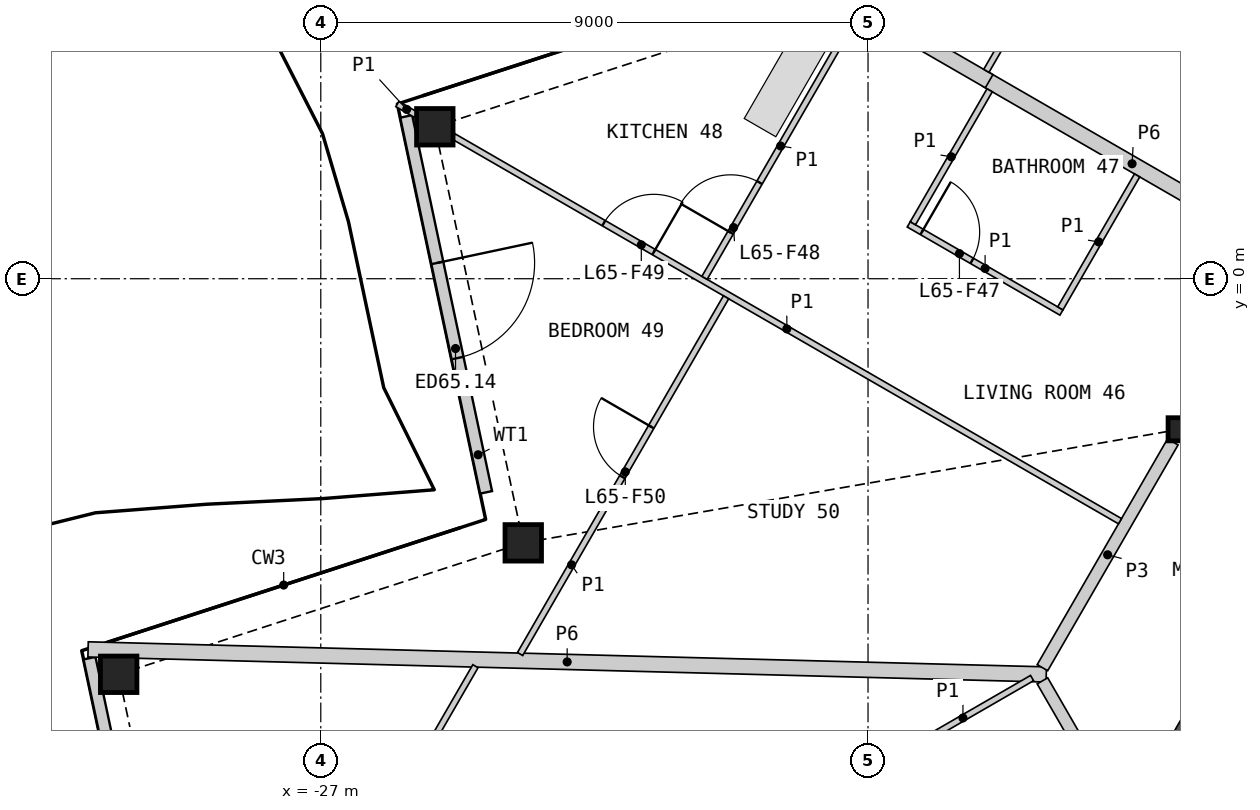
"""IFC4 building model, lengths in metres.
Left out: names, types, materials, properties, quantities, classifications, styles, units other than length and angle.
Written with IfcOpenShell. Run it as: python <this file> out.ifc"""

import sys

from ifc_helpers import new_model, si_unit, direction, frame, frame_2d, origin, origin_2d, place, context, subcontext, project, spatial, polyline, rectangle, hollow_rectangle, i_section, outline, extrude, element, fill, save


model = new_model("IFC4")
c1 = context("Model", 3, precision=1e-05, world=origin(), true_north=direction((0.0, 1.0)))
c2 = subcontext(c1, "Body", "Model", "MODEL_VIEW")
j1 = project(units=[si_unit("LENGTHUNIT", "METRE"), si_unit("PLANEANGLEUNIT", "RADIAN")], contexts=[c1])
p1 = place(None, origin())
s1 = spatial("IfcSite", under=j1, at=p1, CompositionType="ELEMENT")
p2 = place(p1, origin())
s2 = spatial("IfcBuilding", under=s1, at=p2, CompositionType="ELEMENT")
p3 = place(p2, frame((0.0, 0.0, 301.8)))
s3 = spatial("IfcBuildingStorey", under=s2, at=p3, CompositionType="ELEMENT", Elevation=301.8)
for number, where, z_axis, x_axis in (
    (1, (-25.125, 2.499, 0.0), (0.0, 0.0, 1.0), (1.0, 0.0, 0.0)),
    (2, (-23.67, -4.344, 0.0), (0.0, 0.0, 1.0), (1.0, 0.0, 0.0)),
    (3, (-30.324, -6.506, 0.0), (0.0, 0.0, 1.0), (1.0, 0.0, 0.0)),
):
    element("IfcColumn", number, at=place(p3, frame(where, z_axis=z_axis, x_axis=x_axis)), inside=s3, PredefinedType="COLUMN", context=c2, shape_type="SweptSolid", body=[
        extrude(hollow_rectangle(XDim=0.6, YDim=0.6, WallThickness=0.04, at=origin_2d()), origin(), (0.0, 0.0, 1.0), 3.4),
    ])
p4 = place(p3, frame((-12.868, -2.476, 0.0), z_axis=(0.0, 0.0, 1.0), x_axis=(1.0, 0.0, 0.0)))
e4 = element("IfcColumn", 4, at=p4, inside=s3, PredefinedType="COLUMN", context=c2, shape_type="SweptSolid", body=[
    extrude(i_section(OverallWidth=0.396, OverallDepth=0.381, WebThickness=0.019, FlangeThickness=0.03, at=origin_2d()), origin(), (0.0, 0.0, 1.0), 3.4),
])
p5 = place(p3, frame((-25.595, 2.67, 0.0), z_axis=(0.0, 0.0, 1.0), x_axis=(0.207888316408, -0.978152568826, 0.0)))
e5 = element("IfcWall", 5, at=p5, inside=s3, PredefinedType="SOLIDWALL", context=c2, shape_type="SweptSolid", body=[
    extrude(rectangle(XDim=6.322, YDim=0.2, at=frame_2d((3.161, 0.0))), origin(), (0.0, 0.0, 1.0), 2.488),
])
p6 = place(p5, frame((2.463, 0.0, 0.0)))
e6 = element("IfcOpeningElement", 6, at=p6, cuts=e5, PredefinedType="OPENING", context=c2, shape_type="SweptSolid", body=[
    extrude(rectangle(XDim=1.6, YDim=2.25, at=frame_2d((0.8, 1.125))), frame((0.0, 0.11, 0.0), z_axis=(0.0, -1.0, 0.0), x_axis=(1.0, 0.0, 0.0)), (0.0, 0.0, 1.0), 0.22),
])
p7 = place(p3, frame((-30.803, -6.241, 0.0), z_axis=(0.0, 0.0, 1.0), x_axis=(0.207917941651, -0.978146272057, 0.0)))
e7 = element("IfcWall", 7, at=p7, inside=s3, PredefinedType="SOLIDWALL", context=c2, shape_type="SweptSolid", body=[
    extrude(rectangle(XDim=6.759, YDim=0.2, at=frame_2d((3.379, 0.0))), origin(), (0.0, 0.0, 1.0), 2.488),
])
p8 = place(p7, frame((2.545, 0.0, 0.0)))
e8 = element("IfcOpeningElement", 8, at=p8, cuts=e7, PredefinedType="OPENING", context=c2, shape_type="SweptSolid", body=[
    extrude(rectangle(XDim=1.6, YDim=2.25, at=frame_2d((0.8, 1.125))), frame((0.0, 0.11, 0.0), z_axis=(0.0, -1.0, 0.0), x_axis=(1.0, 0.0, 0.0)), (0.0, 0.0, 1.0), 0.22),
])
p9 = place(p3, origin())
e9 = element("IfcWall", 9, at=p9, inside=s3, PredefinedType="SHEAR", context=c2, shape_type="SweptSolid", body=[
    extrude(outline(polyline([(-12.48, -6.606), (-11.961, -6.906), (-11.961, -7.506), (-13.0, -7.506), (-12.48, -6.606)])), origin(), (0.0, 0.0, 1.0), 3.1),
])
p10 = place(p3, frame((-30.827, -6.096, 0.0), z_axis=(0.0, 0.0, 1.0), x_axis=(0.999657799118, -0.026158835273, 0.0)))
e10 = element("IfcWall", 10, at=p10, inside=s3, PredefinedType="PARTITIONING", context=c2, shape_type="SweptSolid", body=[
    extrude(rectangle(XDim=15.763, YDim=0.25, at=frame_2d((7.882, 0.0))), origin(), (0.0, 0.0, 1.0), 2.33),
])
p11 = place(p3, frame((-16.054, 3.275, 0.0), z_axis=(0.0, 0.0, 1.0), x_axis=(0.866019581949, -0.500010083578, 0.0)))
e11 = element("IfcWall", 11, at=p11, inside=s3, PredefinedType="PARTITIONING", context=c2, shape_type="SweptSolid", body=[
    extrude(rectangle(XDim=5.535, YDim=0.25, at=frame_2d((2.768, 0.0))), origin(), (0.0, 0.0, 1.0), 2.33),
])
p12 = place(p3, frame((-15.131, -6.397, 0.0), z_axis=(0.0, 0.0, 1.0), x_axis=(0.500003406062, 0.866023437285, 0.0)))
e12 = element("IfcWall", 12, at=p12, inside=s3, PredefinedType="PARTITIONING", context=c2, shape_type="SweptSolid", body=[
    extrude(rectangle(XDim=4.288, YDim=0.2, at=frame_2d((2.144, 0.0))), origin(), (0.0, 0.0, 1.0), 3.1),
])
p13 = place(p3, frame((-15.131, -6.614, 0.0), z_axis=(0.0, 0.0, 1.0), x_axis=(0.499967746641, -0.866044024469, 0.0)))
e13 = element("IfcWall", 13, at=p13, inside=s3, PredefinedType="PARTITIONING", context=c2, shape_type="SweptSolid", body=[
    extrude(rectangle(XDim=3.676, YDim=0.2, at=frame_2d((1.838, 0.0))), origin(), (0.0, 0.0, 1.0), 3.1),
])
p14 = place(p13, frame((2.426, 0.0, 0.0)))
e14 = element("IfcOpeningElement", 14, at=p14, cuts=e13, PredefinedType="OPENING", context=c2, shape_type="SweptSolid", body=[
    extrude(rectangle(XDim=1.0, YDim=2.1, at=frame_2d((0.5, 1.05))), frame((0.0, 0.11, 0.0), z_axis=(0.0, -1.0, 0.0), x_axis=(1.0, 0.0, 0.0)), (0.0, 0.0, 1.0), 0.22),
])
p15 = place(p3, frame((-18.127, 4.472, 0.0), z_axis=(0.0, 0.0, 1.0), x_axis=(0.866017755388, -0.500013247177, 0.0)))
e15 = element("IfcWall", 15, at=p15, inside=s3, PredefinedType="PARTITIONING", context=c2, shape_type="SweptSolid", body=[
    extrude(rectangle(XDim=2.447, YDim=0.25, at=frame_2d((1.223, 0.0))), origin(), (0.0, 0.0, 1.0), 2.33),
])
p16 = place(p3, frame((-16.054, 3.419, 0.0), z_axis=(0.0, 0.0, 1.0), x_axis=(0.499999256795, 0.866025832873, 0.0)))
e16 = element("IfcWall", 16, at=p16, inside=s3, PredefinedType="PARTITIONING", context=c2, shape_type="SweptSolid", body=[
    extrude(rectangle(XDim=15.448, YDim=0.1, at=frame_2d((7.724, 0.0))), origin(), (0.0, 0.0, 1.0), 2.33),
])
p17 = place(p16, frame((8.306, 0.0, 0.0)))
e17 = element("IfcOpeningElement", 17, at=p17, cuts=e16, PredefinedType="OPENING", context=c2, shape_type="SweptSolid", body=[
    extrude(rectangle(XDim=0.95, YDim=2.1, at=frame_2d((0.475, 1.05))), frame((0.0, 0.06, 0.0), z_axis=(0.0, -1.0, 0.0), x_axis=(1.0, 0.0, 0.0)), (0.0, 0.0, 1.0), 0.12),
])
p18 = place(p16, frame((1.76, 0.0, 0.0)))
e18 = element("IfcOpeningElement", 18, at=p18, cuts=e16, PredefinedType="OPENING", context=c2, shape_type="SweptSolid", body=[
    extrude(rectangle(XDim=0.95, YDim=2.1, at=frame_2d((0.475, 1.05))), frame((0.0, 0.06, 0.0), z_axis=(0.0, -1.0, 0.0), x_axis=(1.0, 0.0, 0.0)), (0.0, 0.0, 1.0), 0.12),
])
p19 = place(p3, frame((-24.815, 2.339, 0.0), z_axis=(0.0, 0.0, 1.0), x_axis=(0.866021406514, -0.500006923412, 0.0)))
e19 = element("IfcWall", 19, at=p19, inside=s3, PredefinedType="PARTITIONING", context=c2, shape_type="SweptSolid", body=[
    extrude(rectangle(XDim=12.654, YDim=0.1, at=frame_2d((6.327, 0.0))), origin(), (0.0, 0.0, 1.0), 2.33),
])
p20 = place(p19, frame((2.851, 0.0, 0.0)))
e20 = element("IfcOpeningElement", 20, at=p20, cuts=e19, PredefinedType="OPENING", context=c2, shape_type="SweptSolid", body=[
    extrude(rectangle(XDim=0.95, YDim=2.1, at=frame_2d((0.475, 1.05))), frame((0.0, 0.06, 0.0), z_axis=(0.0, -1.0, 0.0), x_axis=(1.0, 0.0, 0.0)), (0.0, 0.0, 1.0), 0.12),
])
p21 = place(p3, frame((-23.722, -6.172, 0.0), z_axis=(0.0, 0.0, 1.0), x_axis=(0.499991774685, 0.86603015262, 0.0)))
e21 = element("IfcWall", 21, at=p21, inside=s3, PredefinedType="PARTITIONING", context=c2, shape_type="SweptSolid", body=[
    extrude(rectangle(XDim=6.774, YDim=0.1, at=frame_2d((3.387, 0.0))), origin(), (0.0, 0.0, 1.0), 2.33),
])
p22 = place(p21, frame((3.364, 0.0, 0.0)))
e22 = element("IfcOpeningElement", 22, at=p22, cuts=e21, PredefinedType="OPENING", context=c2, shape_type="SweptSolid", body=[
    extrude(rectangle(XDim=0.95, YDim=2.1, at=frame_2d((0.475, 1.05))), frame((0.0, 0.06, 0.0), z_axis=(0.0, -1.0, 0.0), x_axis=(1.0, 0.0, 0.0)), (0.0, 0.0, 1.0), 0.12),
])
p23 = place(p3, frame((-20.689, 0.014, 0.0), z_axis=(0.0, 0.0, 1.0), x_axis=(0.500003822013, 0.866023197133, 0.0)))
e23 = element("IfcWall", 23, at=p23, inside=s3, PredefinedType="PARTITIONING", context=c2, shape_type="SweptSolid", body=[
    extrude(rectangle(XDim=5.007, YDim=0.1, at=frame_2d((2.504, 0.0))), origin(), (0.0, 0.0, 1.0), 2.33),
])
p24 = place(p23, frame((0.86, 0.0, 0.0)))
e24 = element("IfcOpeningElement", 24, at=p24, cuts=e23, PredefinedType="OPENING", context=c2, shape_type="SweptSolid", body=[
    extrude(rectangle(XDim=0.95, YDim=2.1, at=frame_2d((0.475, 1.05))), frame((0.0, 0.06, 0.0), z_axis=(0.0, -1.0, 0.0), x_axis=(1.0, 0.0, 0.0)), (0.0, 0.0, 1.0), 0.12),
])
p25 = place(p3, frame((-26.788, -10.41, 0.0), z_axis=(0.0, 0.0, 1.0), x_axis=(0.499997484116, 0.866026856326, 0.0)))
e25 = element("IfcWall", 25, at=p25, inside=s3, PredefinedType="PARTITIONING", context=c2, shape_type="SweptSolid", body=[
    extrude(rectangle(XDim=4.662, YDim=0.1, at=frame_2d((2.331, 0.0))), origin(), (0.0, 0.0, 1.0), 2.33),
])
p26 = place(p25, frame((0.752, 0.0, 0.0)))
e26 = element("IfcOpeningElement", 26, at=p26, cuts=e25, PredefinedType="OPENING", context=c2, shape_type="SweptSolid", body=[
    extrude(rectangle(XDim=0.95, YDim=2.1, at=frame_2d((0.475, 1.05))), frame((0.0, 0.06, 0.0), z_axis=(0.0, -1.0, 0.0), x_axis=(1.0, 0.0, 0.0)), (0.0, 0.0, 1.0), 0.12),
])
p27 = place(p3, frame((-17.33, 0.894, 0.0), z_axis=(0.0, 0.0, 1.0), x_axis=(0.866032775405, -0.499987231761, 0.0)))
e27 = element("IfcWall", 27, at=p27, inside=s3, PredefinedType="PARTITIONING", context=c2, shape_type="SweptSolid", body=[
    extrude(rectangle(XDim=2.9, YDim=0.1, at=frame_2d((1.45, 0.0))), origin(), (0.0, 0.0, 1.0), 2.33),
])
p28 = place(p27, frame((0.25, 0.0, 0.0)))
e28 = element("IfcOpeningElement", 28, at=p28, cuts=e27, PredefinedType="OPENING", context=c2, shape_type="SweptSolid", body=[
    extrude(rectangle(XDim=0.95, YDim=2.1, at=frame_2d((0.475, 1.05))), frame((0.0, 0.06, 0.0), z_axis=(0.0, -1.0, 0.0), x_axis=(1.0, 0.0, 0.0)), (0.0, 0.0, 1.0), 0.12),
])
p29 = place(p3, frame((-14.837, -0.488, 0.0), z_axis=(0.0, 0.0, 1.0), x_axis=(0.499976333282, 0.866039067339, 0.0)))
e29 = element("IfcWall", 29, at=p29, inside=s3, PredefinedType="PARTITIONING", context=c2, shape_type="SweptSolid", body=[
    extrude(rectangle(XDim=2.525, YDim=0.1, at=frame_2d((1.262, 0.0))), origin(), (0.0, 0.0, 1.0), 2.33),
])
p30 = place(p3, frame((-17.262, 0.912, 0.0), z_axis=(0.0, 0.0, 1.0), x_axis=(0.500048846702, 0.865997200291, 0.0)))
e30 = element("IfcWall", 30, at=p30, inside=s3, PredefinedType="PARTITIONING", context=c2, shape_type="SweptSolid", body=[
    extrude(rectangle(XDim=2.525, YDim=0.1, at=frame_2d((1.263, 0.0))), origin(), (0.0, 0.0, 1.0), 2.33),
])
p31 = place(p3, frame((-17.575, -7.881, 0.0), z_axis=(0.0, 0.0, 1.0), x_axis=(0.866013657776, 0.500020344131, 0.0)))
e31 = element("IfcWall", 31, at=p31, inside=s3, PredefinedType="PARTITIONING", context=c2, shape_type="SweptSolid", body=[
    extrude(rectangle(XDim=2.625, YDim=0.1, at=frame_2d((1.312, 0.0))), origin(), (0.0, 0.0, 1.0), 2.33),
])
p32 = place(p3, frame((-25.741, 2.874, 0.0), z_axis=(0.0, 0.0, 1.0), x_axis=(0.865851769275, -0.500300623268, 0.0)))
e32 = element("IfcWall", 32, at=p32, inside=s3, PredefinedType="PARTITIONING", context=c2, shape_type="SweptSolid", body=[
    extrude(rectangle(XDim=0.353, YDim=0.1, at=frame_2d((0.177, 0.0))), origin(), (0.0, 0.0, 1.0), 2.33),
])
p33 = place(p6, origin())
e33 = element("IfcDoor", 33, at=p33, inside=s3, OperationType="DOUBLE_DOOR_SINGLE_SWING", PredefinedType="DOOR", context=c2, shape_type="SweptSolid", body=[
    extrude(rectangle(XDim=1.6, YDim=2.25, at=frame_2d((0.8, 1.125))), frame((0.0, 0.025, 0.0), z_axis=(0.0, -1.0, 0.0), x_axis=(1.0, 0.0, 0.0)), (0.0, 0.0, 1.0), 0.05),
])
fill(e6, e33)
p34 = place(p28, origin())
e34 = element("IfcDoor", 34, at=p34, inside=s3, OperationType="SINGLE_SWING_LEFT", PredefinedType="DOOR", context=c2, shape_type="SweptSolid", body=[
    extrude(rectangle(XDim=0.95, YDim=2.1, at=frame_2d((0.475, 1.05))), frame((0.0, 0.025, 0.0), z_axis=(0.0, -1.0, 0.0), x_axis=(1.0, 0.0, 0.0)), (0.0, 0.0, 1.0), 0.05),
])
fill(e28, e34)
p35 = place(p24, origin())
e35 = element("IfcDoor", 35, at=p35, inside=s3, OperationType="SINGLE_SWING_LEFT", PredefinedType="DOOR", context=c2, shape_type="SweptSolid", body=[
    extrude(rectangle(XDim=0.95, YDim=2.1, at=frame_2d((0.475, 1.05))), frame((0.0, 0.025, 0.0), z_axis=(0.0, -1.0, 0.0), x_axis=(1.0, 0.0, 0.0)), (0.0, 0.0, 1.0), 0.05),
])
fill(e24, e35)
p36 = place(p20, origin())
e36 = element("IfcDoor", 36, at=p36, inside=s3, OperationType="SINGLE_SWING_RIGHT", PredefinedType="DOOR", context=c2, shape_type="SweptSolid", body=[
    extrude(rectangle(XDim=0.95, YDim=2.1, at=frame_2d((0.475, 1.05))), frame((0.0, 0.025, 0.0), z_axis=(0.0, -1.0, 0.0), x_axis=(1.0, 0.0, 0.0)), (0.0, 0.0, 1.0), 0.05),
])
fill(e20, e36)
p37 = place(p22, origin())
e37 = element("IfcDoor", 37, at=p37, inside=s3, OperationType="SINGLE_SWING_RIGHT", PredefinedType="DOOR", context=c2, shape_type="SweptSolid", body=[
    extrude(rectangle(XDim=0.95, YDim=2.1, at=frame_2d((0.475, 1.05))), frame((0.0, 0.025, 0.0), z_axis=(0.0, -1.0, 0.0), x_axis=(1.0, 0.0, 0.0)), (0.0, 0.0, 1.0), 0.05),
])
fill(e22, e37)
save(model, sys.argv[1])
